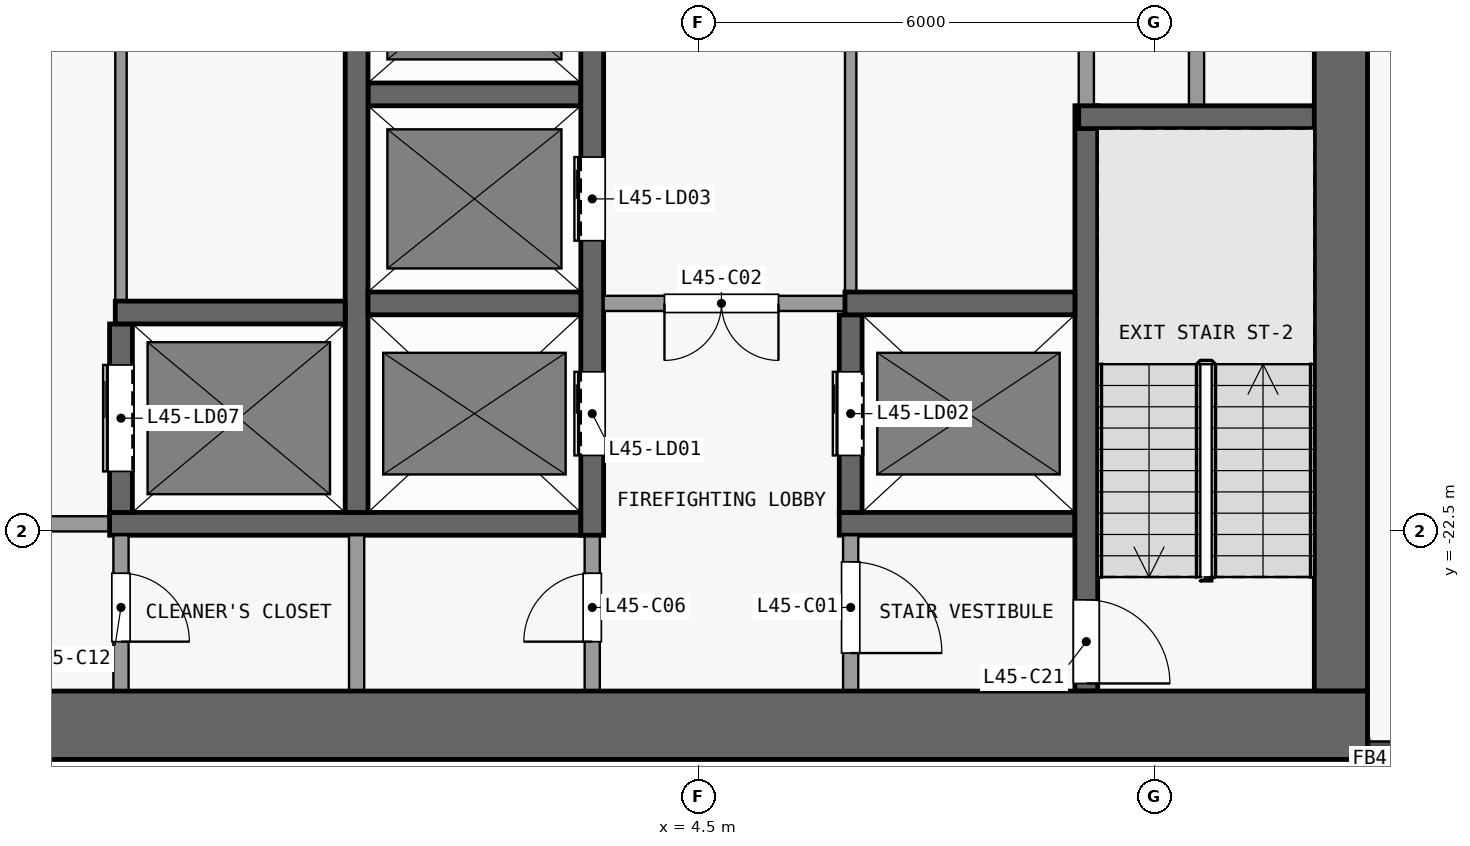
"""IFC4 building model, lengths in metres.
Left out: names, types, materials, properties, quantities, classifications, styles, units other than length and angle.
Written with IfcOpenShell. Run it as: python <this file> out.ifc"""

import sys

from ifc_helpers import new_model, si_unit, direction, frame, frame_2d, origin, place, context, subcontext, project, spatial, rectangle, extrude, element, fill, save


model = new_model("IFC4")
c1 = context("Model", 3, precision=1e-05, world=origin(), true_north=direction((0.0, 1.0)))
c2 = subcontext(c1, "Body", "Model", "MODEL_VIEW")
j1 = project(units=[si_unit("LENGTHUNIT", "METRE"), si_unit("PLANEANGLEUNIT", "RADIAN")], contexts=[c1])
p1 = place(None, origin())
s1 = spatial("IfcSite", under=j1, at=p1, CompositionType="ELEMENT")
p2 = place(p1, origin())
s2 = spatial("IfcBuilding", under=s1, at=p2, CompositionType="ELEMENT")
p3 = place(p2, frame((0.0, 0.0, 181.7)))
s3 = spatial("IfcBuildingStorey", under=s2, at=p3, CompositionType="ELEMENT", Elevation=181.7)
p4 = place(p3, frame((-13.3, -25.05, 0.0), z_axis=(0.0, 0.0, 1.0), x_axis=(1.0, 0.0, 0.0)))
e1 = element("IfcWall", 1, at=p4, inside=s3, PredefinedType="SHEAR", context=c2, shape_type="SweptSolid", body=[
    extrude(rectangle(XDim=26.6, YDim=0.9, at=frame_2d((13.3, 0.0))), origin(), (0.0, 0.0, 1.0), 3.3),
])
p5 = place(p3, frame((12.95, -24.6, 0.0), z_axis=(0.0, 0.0, 1.0), x_axis=(0.0, 1.0, 0.0)))
e2 = element("IfcWall", 2, at=p5, inside=s3, PredefinedType="SHEAR", context=c2, shape_type="SweptSolid", body=[
    extrude(rectangle(XDim=16.1, YDim=0.7, at=frame_2d((8.05, 0.0))), origin(), (0.0, 0.0, 1.0), 3.3),
])
p6 = place(p3, frame((-3.25, -22.4, 0.0), z_axis=(0.0, 0.0, 1.0), x_axis=(-1.0, 0.0, 0.0)))
e3 = element("IfcWall", 3, at=p6, inside=s3, PredefinedType="PARTITIONING", context=c2, shape_type="SweptSolid", body=[
    extrude(rectangle(XDim=6.2, YDim=0.2, at=frame_2d((3.1, 0.0))), origin(), (0.0, 0.0, 1.0), 3.3),
])
p7 = place(p6, frame((0.8, 0.0, 0.0)))
e4 = element("IfcOpeningElement", 4, at=p7, cuts=e3, PredefinedType="OPENING", context=c2, shape_type="SweptSolid", body=[
    extrude(rectangle(XDim=1.5, YDim=2.1, at=frame_2d((0.75, 1.05))), frame((0.0, 0.11, 0.0), z_axis=(0.0, -1.0, 0.0), x_axis=(1.0, 0.0, 0.0)), (0.0, 0.0, 1.0), 0.22),
])
p8 = place(p3, frame((-3.25, -22.4, 0.0), z_axis=(0.0, 0.0, 1.0), x_axis=(1.0, 0.0, 0.0)))
e5 = element("IfcWall", 5, at=p8, inside=s3, PredefinedType="SHEAR", context=c2, shape_type="SweptSolid", body=[
    extrude(rectangle(XDim=6.2, YDim=0.3, at=frame_2d((3.1, 0.0))), origin(), (0.0, 0.0, 1.0), 3.3),
])
p9 = place(p3, frame((6.35, -22.4, 0.0), z_axis=(0.0, 0.0, 1.0), x_axis=(1.0, 0.0, 0.0)))
e6 = element("IfcWall", 6, at=p9, inside=s3, PredefinedType="SHEAR", context=c2, shape_type="SweptSolid", body=[
    extrude(rectangle(XDim=3.1, YDim=0.3, at=frame_2d((1.55, 0.0))), origin(), (0.0, 0.0, 1.0), 3.3),
])
p10 = place(p3, frame((-3.175, -19.62, 0.0), z_axis=(0.0, 0.0, 1.0), x_axis=(1.0, 0.0, 0.0)))
e7 = element("IfcWall", 7, at=p10, inside=s3, PredefinedType="SHEAR", context=c2, shape_type="SweptSolid", body=[
    extrude(rectangle(XDim=3.025, YDim=0.3, at=frame_2d((1.513, 0.0))), origin(), (0.0, 0.0, 1.0), 3.3),
])
p11 = place(p3, frame((0.15, -19.5, 0.0), z_axis=(0.0, 0.0, 1.0), x_axis=(1.0, 0.0, 0.0)))
e8 = element("IfcWall", 8, at=p11, inside=s3, PredefinedType="SHEAR", context=c2, shape_type="SweptSolid", body=[
    extrude(rectangle(XDim=2.8, YDim=0.3, at=frame_2d((1.4, 0.0))), origin(), (0.0, 0.0, 1.0), 3.3),
])
p12 = place(p3, frame((6.575, -19.5, 0.0), z_axis=(0.0, 0.0, 1.0), x_axis=(-1.0, 0.0, 0.0)))
e9 = element("IfcWall", 9, at=p12, inside=s3, PredefinedType="PARTITIONING", context=c2, shape_type="SweptSolid", body=[
    extrude(rectangle(XDim=3.325, YDim=0.2, at=frame_2d((1.663, 0.0))), origin(), (0.0, 0.0, 1.0), 3.3),
])
p13 = place(p12, frame((1.025, 0.0, 0.0)))
e10 = element("IfcOpeningElement", 10, at=p13, cuts=e9, PredefinedType="OPENING", context=c2, shape_type="SweptSolid", body=[
    extrude(rectangle(XDim=1.5, YDim=2.1, at=frame_2d((0.75, 1.05))), frame((0.0, 0.11, 0.0), z_axis=(0.0, -1.0, 0.0), x_axis=(1.0, 0.0, 0.0)), (0.0, 0.0, 1.0), 0.22),
])
p14 = place(p3, frame((6.425, -19.5, 0.0), z_axis=(0.0, 0.0, 1.0), x_axis=(1.0, 0.0, 0.0)))
e11 = element("IfcWall", 11, at=p14, inside=s3, PredefinedType="SHEAR", context=c2, shape_type="SweptSolid", body=[
    extrude(rectangle(XDim=3.025, YDim=0.3, at=frame_2d((1.512, 0.0))), origin(), (0.0, 0.0, 1.0), 3.3),
])
p15 = place(p3, frame((9.5, -17.05, 0.0), z_axis=(0.0, 0.0, 1.0), x_axis=(1.0, 0.0, 0.0)))
e12 = element("IfcWall", 12, at=p15, inside=s3, PredefinedType="SHEAR", context=c2, shape_type="SweptSolid", body=[
    extrude(rectangle(XDim=3.1, YDim=0.3, at=frame_2d((1.55, 0.0))), origin(), (0.0, 0.0, 1.0), 3.3),
])
p16 = place(p3, frame((0.15, -16.75, 0.0), z_axis=(0.0, 0.0, 1.0), x_axis=(1.0, 0.0, 0.0)))
e13 = element("IfcWall", 13, at=p16, inside=s3, PredefinedType="SHEAR", context=c2, shape_type="SweptSolid", body=[
    extrude(rectangle(XDim=2.8, YDim=0.3, at=frame_2d((1.4, 0.0))), origin(), (0.0, 0.0, 1.0), 3.3),
])
p17 = place(p3, frame((-3.1, -22.55, 0.0), z_axis=(0.0, 0.0, 1.0), x_axis=(0.0, -1.0, 0.0)))
e14 = element("IfcWall", 14, at=p17, inside=s3, PredefinedType="PARTITIONING", context=c2, shape_type="SweptSolid", body=[
    extrude(rectangle(XDim=2.05, YDim=0.2, at=frame_2d((1.025, 0.0))), origin(), (0.0, 0.0, 1.0), 3.3),
])
p18 = place(p17, frame((0.5, 0.0, 0.0)))
e15 = element("IfcOpeningElement", 15, at=p18, cuts=e14, PredefinedType="OPENING", context=c2, shape_type="SweptSolid", body=[
    extrude(rectangle(XDim=0.9, YDim=2.1, at=frame_2d((0.45, 1.05))), frame((0.0, 0.11, 0.0), z_axis=(0.0, -1.0, 0.0), x_axis=(1.0, 0.0, 0.0)), (0.0, 0.0, 1.0), 0.22),
])
p19 = place(p3, frame((-3.1, -22.25, 0.0), z_axis=(0.0, 0.0, 1.0), x_axis=(0.0, 1.0, 0.0)))
e16 = element("IfcWall", 16, at=p19, inside=s3, PredefinedType="SHEAR", context=c2, shape_type="SweptSolid", body=[
    extrude(rectangle(XDim=2.48, YDim=0.3, at=frame_2d((1.24, 0.0))), origin(), (0.0, 0.0, 1.0), 3.3),
])
p20 = place(p19, frame((0.54, 0.0, 0.0)))
e17 = element("IfcOpeningElement", 17, at=p20, cuts=e16, PredefinedType="OPENING", context=c2, shape_type="SweptSolid", body=[
    extrude(rectangle(XDim=1.4, YDim=2.1, at=frame_2d((0.7, 1.05))), frame((0.0, 0.16, 0.0), z_axis=(0.0, -1.0, 0.0), x_axis=(1.0, 0.0, 0.0)), (0.0, 0.0, 1.0), 0.32),
])
p21 = place(p3, frame((-3.1, -8.5, 0.0), z_axis=(0.0, 0.0, 1.0), x_axis=(0.0, -1.0, 0.0)))
e18 = element("IfcWall", 18, at=p21, inside=s3, PredefinedType="PARTITIONING", context=c2, shape_type="SweptSolid", body=[
    extrude(rectangle(XDim=10.97, YDim=0.15, at=frame_2d((5.485, 0.0))), origin(), (0.0, 0.0, 1.0), 3.3),
])
p22 = place(p21, frame((4.96, 0.0, 0.0)))
e19 = element("IfcOpeningElement", 19, at=p22, cuts=e18, PredefinedType="OPENING", context=c2, shape_type="SweptSolid", body=[
    extrude(rectangle(XDim=1.2, YDim=2.1, at=frame_2d((0.6, 1.05))), frame((0.0, 0.085, 0.0), z_axis=(0.0, -1.0, 0.0), x_axis=(1.0, 0.0, 0.0)), (0.0, 0.0, 1.0), 0.17),
])
p23 = place(p3, frame((0.0, -24.6, 0.0), z_axis=(0.0, 0.0, 1.0), x_axis=(0.0, 1.0, 0.0)))
e20 = element("IfcWall", 20, at=p23, inside=s3, PredefinedType="PARTITIONING", context=c2, shape_type="SweptSolid", body=[
    extrude(rectangle(XDim=2.05, YDim=0.2, at=frame_2d((1.025, 0.0))), origin(), (0.0, 0.0, 1.0), 3.3),
])
p24 = place(p3, frame((0.0, -22.25, 0.0), z_axis=(0.0, 0.0, 1.0), x_axis=(0.0, 1.0, 0.0)))
e21 = element("IfcWall", 21, at=p24, inside=s3, PredefinedType="SHEAR", context=c2, shape_type="SweptSolid", body=[
    extrude(rectangle(XDim=13.75, YDim=0.3, at=frame_2d((6.875, 0.0))), origin(), (0.0, 0.0, 1.0), 3.3),
])
p25 = place(p3, frame((3.1, -24.6, 0.0), z_axis=(0.0, 0.0, 1.0), x_axis=(0.0, 1.0, 0.0)))
e22 = element("IfcWall", 22, at=p25, inside=s3, PredefinedType="PARTITIONING", context=c2, shape_type="SweptSolid", body=[
    extrude(rectangle(XDim=2.05, YDim=0.2, at=frame_2d((1.025, 0.0))), origin(), (0.0, 0.0, 1.0), 3.3),
])
p26 = place(p25, frame((0.65, 0.0, 0.0)))
e23 = element("IfcOpeningElement", 23, at=p26, cuts=e22, PredefinedType="OPENING", context=c2, shape_type="SweptSolid", body=[
    extrude(rectangle(XDim=0.9, YDim=2.1, at=frame_2d((0.45, 1.05))), frame((0.0, 0.11, 0.0), z_axis=(0.0, -1.0, 0.0), x_axis=(1.0, 0.0, 0.0)), (0.0, 0.0, 1.0), 0.22),
])
p27 = place(p3, frame((3.1, -22.55, 0.0), z_axis=(0.0, 0.0, 1.0), x_axis=(0.0, 1.0, 0.0)))
e24 = element("IfcWall", 24, at=p27, inside=s3, PredefinedType="SHEAR", context=c2, shape_type="SweptSolid", body=[
    extrude(rectangle(XDim=14.05, YDim=0.3, at=frame_2d((7.025, 0.0))), origin(), (0.0, 0.0, 1.0), 3.3),
])
p28 = place(p27, frame((1.05, 0.0, 0.0)))
e25 = element("IfcOpeningElement", 25, at=p28, cuts=e24, PredefinedType="OPENING", context=c2, shape_type="SweptSolid", body=[
    extrude(rectangle(XDim=1.1, YDim=2.1, at=frame_2d((0.55, 1.05))), frame((0.0, 0.16, 0.0), z_axis=(0.0, -1.0, 0.0), x_axis=(1.0, 0.0, 0.0)), (0.0, 0.0, 1.0), 0.32),
])
p29 = place(p27, frame((3.875, 0.0, 0.0)))
e26 = element("IfcOpeningElement", 26, at=p29, cuts=e24, PredefinedType="OPENING", context=c2, shape_type="SweptSolid", body=[
    extrude(rectangle(XDim=1.1, YDim=2.1, at=frame_2d((0.55, 1.05))), frame((0.0, 0.16, 0.0), z_axis=(0.0, -1.0, 0.0), x_axis=(1.0, 0.0, 0.0)), (0.0, 0.0, 1.0), 0.32),
])
p30 = place(p27, frame((6.625, 0.0, 0.0)))
e27 = element("IfcOpeningElement", 27, at=p30, cuts=e24, PredefinedType="OPENING", context=c2, shape_type="SweptSolid", body=[
    extrude(rectangle(XDim=1.1, YDim=2.1, at=frame_2d((0.55, 1.05))), frame((0.0, 0.16, 0.0), z_axis=(0.0, -1.0, 0.0), x_axis=(1.0, 0.0, 0.0)), (0.0, 0.0, 1.0), 0.32),
])
p31 = place(p27, frame((9.375, 0.0, 0.0)))
e28 = element("IfcOpeningElement", 28, at=p31, cuts=e24, PredefinedType="OPENING", context=c2, shape_type="SweptSolid", body=[
    extrude(rectangle(XDim=1.1, YDim=2.1, at=frame_2d((0.55, 1.05))), frame((0.0, 0.16, 0.0), z_axis=(0.0, -1.0, 0.0), x_axis=(1.0, 0.0, 0.0)), (0.0, 0.0, 1.0), 0.32),
])
p32 = place(p27, frame((12.125, 0.0, 0.0)))
e29 = element("IfcOpeningElement", 29, at=p32, cuts=e24, PredefinedType="OPENING", context=c2, shape_type="SweptSolid", body=[
    extrude(rectangle(XDim=1.1, YDim=2.1, at=frame_2d((0.55, 1.05))), frame((0.0, 0.16, 0.0), z_axis=(0.0, -1.0, 0.0), x_axis=(1.0, 0.0, 0.0)), (0.0, 0.0, 1.0), 0.32),
])
p33 = place(p3, frame((6.5, -22.55, 0.0), z_axis=(0.0, 0.0, 1.0), x_axis=(0.0, -1.0, 0.0)))
e30 = element("IfcWall", 30, at=p33, inside=s3, PredefinedType="PARTITIONING", context=c2, shape_type="SweptSolid", body=[
    extrude(rectangle(XDim=2.05, YDim=0.2, at=frame_2d((1.025, 0.0))), origin(), (0.0, 0.0, 1.0), 3.3),
])
p34 = place(p33, frame((0.35, 0.0, 0.0)))
e31 = element("IfcOpeningElement", 31, at=p34, cuts=e30, PredefinedType="OPENING", context=c2, shape_type="SweptSolid", body=[
    extrude(rectangle(XDim=1.2, YDim=2.1, at=frame_2d((0.6, 1.05))), frame((0.0, 0.11, 0.0), z_axis=(0.0, -1.0, 0.0), x_axis=(1.0, 0.0, 0.0)), (0.0, 0.0, 1.0), 0.22),
])
p35 = place(p3, frame((6.5, -22.25, 0.0), z_axis=(0.0, 0.0, 1.0), x_axis=(0.0, 1.0, 0.0)))
e32 = element("IfcWall", 32, at=p35, inside=s3, PredefinedType="SHEAR", context=c2, shape_type="SweptSolid", body=[
    extrude(rectangle(XDim=2.6, YDim=0.3, at=frame_2d((1.3, 0.0))), origin(), (0.0, 0.0, 1.0), 3.3),
])
p36 = place(p35, frame((0.75, 0.0, 0.0)))
e33 = element("IfcOpeningElement", 33, at=p36, cuts=e32, PredefinedType="OPENING", context=c2, shape_type="SweptSolid", body=[
    extrude(rectangle(XDim=1.1, YDim=2.1, at=frame_2d((0.55, 1.05))), frame((0.0, 0.16, 0.0), z_axis=(0.0, -1.0, 0.0), x_axis=(1.0, 0.0, 0.0)), (0.0, 0.0, 1.0), 0.32),
])
p37 = place(p3, frame((6.5, -8.5, 0.0), z_axis=(0.0, 0.0, 1.0), x_axis=(0.0, -1.0, 0.0)))
e34 = element("IfcWall", 34, at=p37, inside=s3, PredefinedType="PARTITIONING", context=c2, shape_type="SweptSolid", body=[
    extrude(rectangle(XDim=10.85, YDim=0.15, at=frame_2d((5.425, 0.0))), origin(), (0.0, 0.0, 1.0), 3.3),
])
p38 = place(p37, frame((6.275, 0.0, 0.0)))
e35 = element("IfcOpeningElement", 35, at=p38, cuts=e34, PredefinedType="OPENING", context=c2, shape_type="SweptSolid", body=[
    extrude(rectangle(XDim=1.2, YDim=2.1, at=frame_2d((0.6, 1.05))), frame((0.0, 0.085, 0.0), z_axis=(0.0, -1.0, 0.0), x_axis=(1.0, 0.0, 0.0)), (0.0, 0.0, 1.0), 0.17),
])
p39 = place(p37, frame((0.925, 0.0, 0.0)))
e36 = element("IfcOpeningElement", 36, at=p39, cuts=e34, PredefinedType="OPENING", context=c2, shape_type="SweptSolid", body=[
    extrude(rectangle(XDim=0.9, YDim=2.1, at=frame_2d((0.45, 1.05))), frame((0.0, 0.085, 0.0), z_axis=(0.0, -1.0, 0.0), x_axis=(1.0, 0.0, 0.0)), (0.0, 0.0, 1.0), 0.17),
])
p40 = place(p3, frame((9.6, -16.9, 0.0), z_axis=(0.0, 0.0, 1.0), x_axis=(0.0, -1.0, 0.0)))
e37 = element("IfcWall", 37, at=p40, inside=s3, PredefinedType="SHEAR", context=c2, shape_type="SweptSolid", body=[
    extrude(rectangle(XDim=7.7, YDim=0.3, at=frame_2d((3.85, 0.0))), origin(), (0.0, 0.0, 1.0), 3.3),
])
p41 = place(p40, frame((6.5, 0.0, 0.0)))
e38 = element("IfcOpeningElement", 38, at=p41, cuts=e37, PredefinedType="OPENING", context=c2, shape_type="SweptSolid", body=[
    extrude(rectangle(XDim=1.1, YDim=2.1, at=frame_2d((0.55, 1.05))), frame((0.0, 0.16, 0.0), z_axis=(0.0, -1.0, 0.0), x_axis=(1.0, 0.0, 0.0)), (0.0, 0.0, 1.0), 0.32),
])
p42 = place(p3, frame((9.6, -16.9, 0.0), z_axis=(0.0, 0.0, 1.0), x_axis=(0.0, 1.0, 0.0)))
e39 = element("IfcWall", 39, at=p42, inside=s3, PredefinedType="PARTITIONING", context=c2, shape_type="SweptSolid", body=[
    extrude(rectangle(XDim=8.4, YDim=0.2, at=frame_2d((4.2, 0.0))), origin(), (0.0, 0.0, 1.0), 3.3),
])
p43 = place(p3, frame((11.05, -11.2, 0.0), z_axis=(0.0, 0.0, 1.0), x_axis=(0.0, -1.0, 0.0)))
e40 = element("IfcWall", 40, at=p43, inside=s3, PredefinedType="PARTITIONING", context=c2, shape_type="SweptSolid", body=[
    extrude(rectangle(XDim=5.7, YDim=0.2, at=frame_2d((2.85, 0.0))), origin(), (0.0, 0.0, 1.0), 3.3),
])
p44 = place(p43, frame((2.525, 0.0, 0.0)))
e41 = element("IfcOpeningElement", 41, at=p44, cuts=e40, PredefinedType="OPENING", context=c2, shape_type="SweptSolid", body=[
    extrude(rectangle(XDim=0.9, YDim=2.1, at=frame_2d((0.45, 1.05))), frame((0.0, 0.11, 0.0), z_axis=(0.0, -1.0, 0.0), x_axis=(1.0, 0.0, 0.0)), (0.0, 0.0, 1.0), 0.22),
])
p45 = place(p28, origin())
e42 = element("IfcDoor", 42, at=p45, inside=s3, OperationType="DOUBLE_DOOR_SLIDING", PredefinedType="DOOR", context=c2, shape_type="SweptSolid", body=[
    extrude(rectangle(XDim=1.1, YDim=2.1, at=frame_2d((0.55, 1.05))), frame((0.0, 0.025, 0.0), z_axis=(0.0, -1.0, 0.0), x_axis=(1.0, 0.0, 0.0)), (0.0, 0.0, 1.0), 0.05),
])
fill(e25, e42)
p46 = place(p36, origin())
e43 = element("IfcDoor", 43, at=p46, inside=s3, OperationType="DOUBLE_DOOR_SLIDING", PredefinedType="DOOR", context=c2, shape_type="SweptSolid", body=[
    extrude(rectangle(XDim=1.1, YDim=2.1, at=frame_2d((0.55, 1.05))), frame((0.0, 0.025, 0.0), z_axis=(0.0, -1.0, 0.0), x_axis=(1.0, 0.0, 0.0)), (0.0, 0.0, 1.0), 0.05),
])
fill(e33, e43)
p47 = place(p29, origin())
e44 = element("IfcDoor", 44, at=p47, inside=s3, OperationType="DOUBLE_DOOR_SLIDING", PredefinedType="DOOR", context=c2, shape_type="SweptSolid", body=[
    extrude(rectangle(XDim=1.1, YDim=2.1, at=frame_2d((0.55, 1.05))), frame((0.0, 0.025, 0.0), z_axis=(0.0, -1.0, 0.0), x_axis=(1.0, 0.0, 0.0)), (0.0, 0.0, 1.0), 0.05),
])
fill(e26, e44)
p48 = place(p20, origin())
e45 = element("IfcDoor", 45, at=p48, inside=s3, OperationType="DOUBLE_DOOR_SLIDING", PredefinedType="DOOR", context=c2, shape_type="SweptSolid", body=[
    extrude(rectangle(XDim=1.4, YDim=2.1, at=frame_2d((0.7, 1.05))), frame((0.0, 0.025, 0.0), z_axis=(0.0, -1.0, 0.0), x_axis=(1.0, 0.0, 0.0)), (0.0, 0.0, 1.0), 0.05),
])
fill(e17, e45)
p49 = place(p34, origin())
e46 = element("IfcDoor", 46, at=p49, inside=s3, OperationType="SINGLE_SWING_RIGHT", PredefinedType="DOOR", context=c2, shape_type="SweptSolid", body=[
    extrude(rectangle(XDim=1.2, YDim=2.1, at=frame_2d((0.6, 1.05))), frame((0.0, 0.025, 0.0), z_axis=(0.0, -1.0, 0.0), x_axis=(1.0, 0.0, 0.0)), (0.0, 0.0, 1.0), 0.05),
])
fill(e31, e46)
p50 = place(p13, origin())
e47 = element("IfcDoor", 47, at=p50, inside=s3, OperationType="DOUBLE_DOOR_SINGLE_SWING", PredefinedType="DOOR", context=c2, shape_type="SweptSolid", body=[
    extrude(rectangle(XDim=1.5, YDim=2.1, at=frame_2d((0.75, 1.05))), frame((0.0, 0.025, 0.0), z_axis=(0.0, -1.0, 0.0), x_axis=(1.0, 0.0, 0.0)), (0.0, 0.0, 1.0), 0.05),
])
fill(e10, e47)
p51 = place(p26, origin())
e48 = element("IfcDoor", 48, at=p51, inside=s3, OperationType="SINGLE_SWING_LEFT", PredefinedType="DOOR", context=c2, shape_type="SweptSolid", body=[
    extrude(rectangle(XDim=0.9, YDim=2.1, at=frame_2d((0.45, 1.05))), frame((0.0, 0.025, 0.0), z_axis=(0.0, -1.0, 0.0), x_axis=(1.0, 0.0, 0.0)), (0.0, 0.0, 1.0), 0.05),
])
fill(e23, e48)
p52 = place(p18, origin())
e49 = element("IfcDoor", 49, at=p52, inside=s3, OperationType="SINGLE_SWING_RIGHT", PredefinedType="DOOR", context=c2, shape_type="SweptSolid", body=[
    extrude(rectangle(XDim=0.9, YDim=2.1, at=frame_2d((0.45, 1.05))), frame((0.0, 0.025, 0.0), z_axis=(0.0, -1.0, 0.0), x_axis=(1.0, 0.0, 0.0)), (0.0, 0.0, 1.0), 0.05),
])
fill(e15, e49)
p53 = place(p41, origin())
e50 = element("IfcDoor", 50, at=p53, inside=s3, OperationType="SINGLE_SWING_RIGHT", PredefinedType="DOOR", context=c2, shape_type="SweptSolid", body=[
    extrude(rectangle(XDim=1.1, YDim=2.1, at=frame_2d((0.55, 1.05))), frame((0.0, 0.025, 0.0), z_axis=(0.0, -1.0, 0.0), x_axis=(1.0, 0.0, 0.0)), (0.0, 0.0, 1.0), 0.05),
])
fill(e38, e50)
save(model, sys.argv[1])
